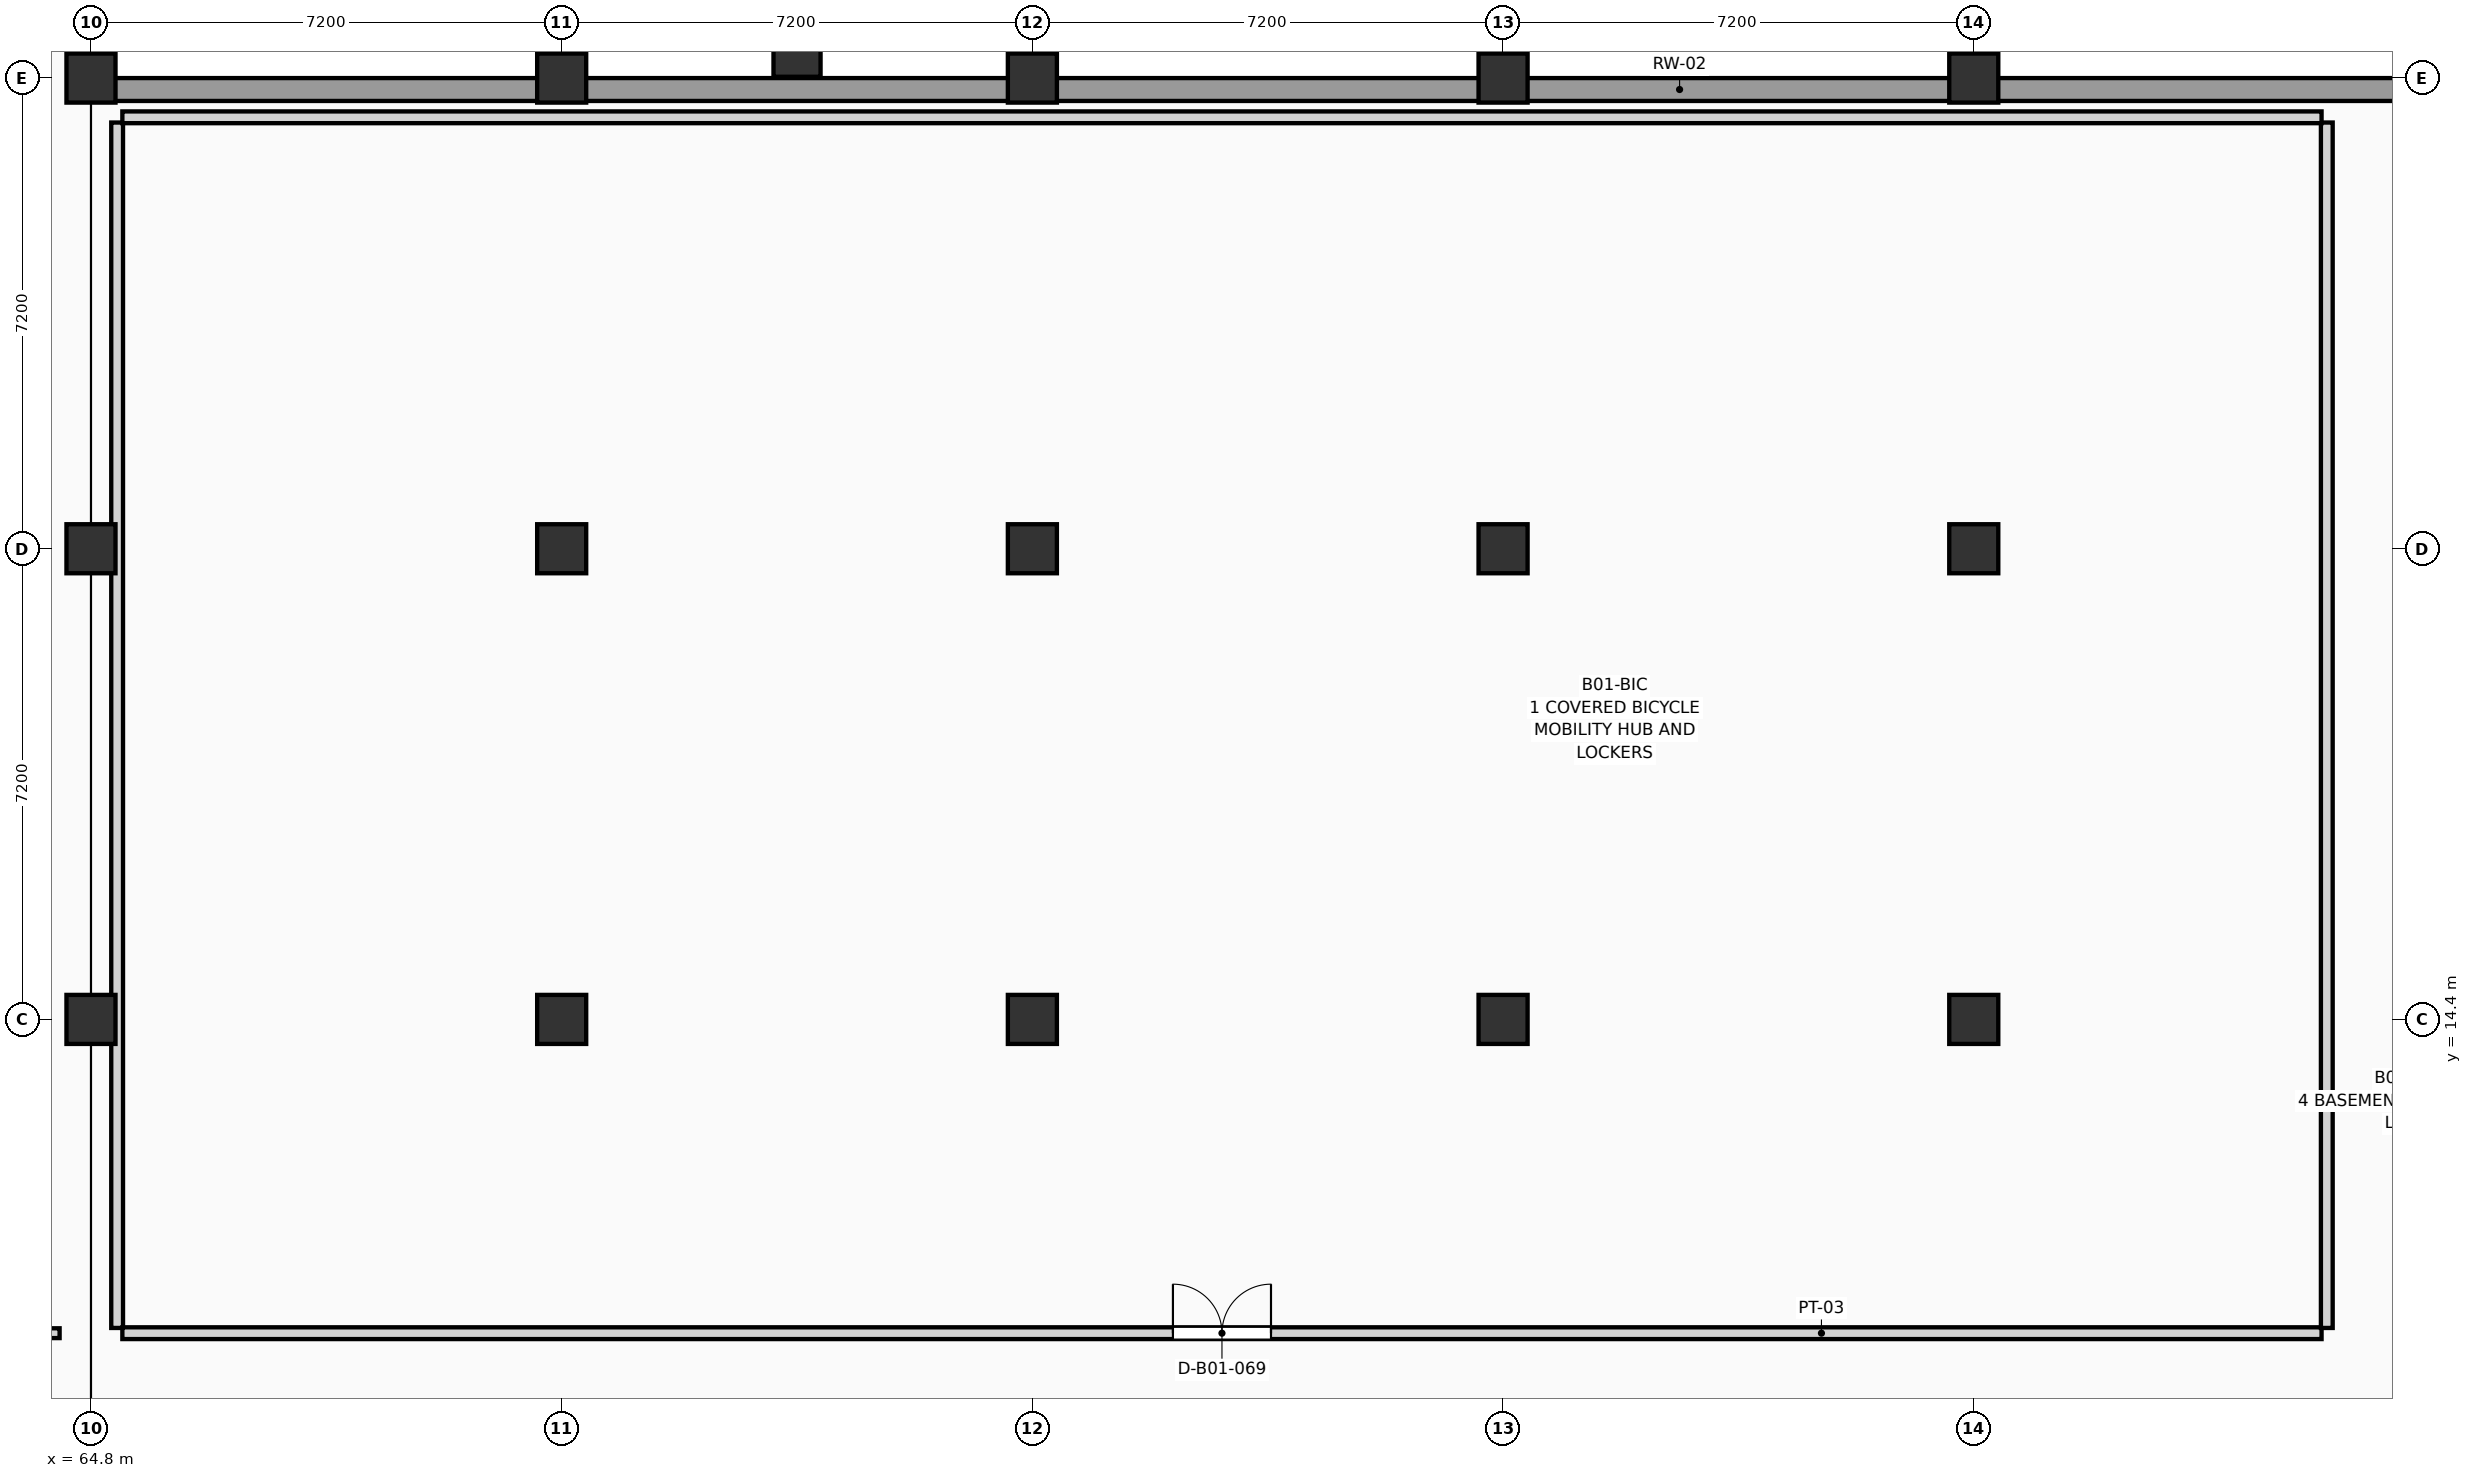
"""IFC4 building model, lengths in metres.
Left out: names, types, materials, properties, quantities, classifications, styles, units other than length and angle.
Written with IfcOpenShell. Run it as: python <this file> out.ifc"""

import sys

from ifc_helpers import new_model, si_unit, direction, frame, frame_2d, origin, origin_2d, place, context, subcontext, project, spatial, rectangle, extrude, element, fill, save


model = new_model("IFC4")
c1 = context("Model", 3, precision=1e-05, world=origin(), true_north=direction((0.0, 1.0)))
c2 = subcontext(c1, "Body", "Model", "MODEL_VIEW")
j1 = project(units=[si_unit("LENGTHUNIT", "METRE"), si_unit("PLANEANGLEUNIT", "RADIAN")], contexts=[c1])
p1 = place(None, origin())
s1 = spatial("IfcSite", under=j1, at=p1, CompositionType="ELEMENT")
p2 = place(p1, origin())
s2 = spatial("IfcBuilding", under=s1, at=p2, CompositionType="ELEMENT")
p3 = place(p2, frame((0.0, 0.0, -4.5)))
s3 = spatial("IfcBuildingStorey", under=s2, at=p3, CompositionType="ELEMENT", Elevation=-4.5)
for number, where, z_axis, x_axis in (
    (1, (64.8, 14.4, -0.3), (0.0, 0.0, 1.0), (1.0, 0.0, 0.0)),
    (2, (64.8, 21.6, -0.3), (0.0, 0.0, 1.0), (1.0, 0.0, 0.0)),
    (3, (64.8, 28.8, -0.3), (0.0, 0.0, 1.0), (1.0, 0.0, 0.0)),
    (4, (72.0, 14.4, -0.3), (0.0, 0.0, 1.0), (1.0, 0.0, 0.0)),
    (5, (72.0, 21.6, -0.3), (0.0, 0.0, 1.0), (1.0, 0.0, 0.0)),
    (6, (72.0, 28.8, -0.3), (0.0, 0.0, 1.0), (1.0, 0.0, 0.0)),
    (7, (79.2, 14.4, -0.3), (0.0, 0.0, 1.0), (1.0, 0.0, 0.0)),
    (8, (79.2, 21.6, -0.3), (0.0, 0.0, 1.0), (1.0, 0.0, 0.0)),
    (9, (79.2, 28.8, -0.3), (0.0, 0.0, 1.0), (1.0, 0.0, 0.0)),
    (10, (86.4, 14.4, -0.3), (0.0, 0.0, 1.0), (1.0, 0.0, 0.0)),
    (11, (86.4, 21.6, -0.3), (0.0, 0.0, 1.0), (1.0, 0.0, 0.0)),
    (12, (86.4, 28.8, -0.3), (0.0, 0.0, 1.0), (1.0, 0.0, 0.0)),
    (13, (93.6, 14.4, -0.3), (0.0, 0.0, 1.0), (1.0, 0.0, 0.0)),
    (14, (93.6, 21.6, -0.3), (0.0, 0.0, 1.0), (1.0, 0.0, 0.0)),
    (15, (93.6, 28.8, -0.3), (0.0, 0.0, 1.0), (1.0, 0.0, 0.0)),
):
    element("IfcColumn", number, at=place(p3, frame(where, z_axis=z_axis, x_axis=x_axis)), inside=s3, PredefinedType="COLUMN", context=c2, shape_type="SweptSolid", body=[
        extrude(rectangle(XDim=0.75, YDim=0.75, at=origin_2d()), origin(), (0.0, 0.0, 1.0), 4.8),
    ])
p4 = place(p3, frame((75.6, 29.08, -0.3), z_axis=(0.0, 0.0, 1.0), x_axis=(0.0, 1.0, 0.0)))
e16 = element("IfcColumn", 16, at=p4, inside=s3, PredefinedType="PILASTER", context=c2, shape_type="SweptSolid", body=[
    extrude(rectangle(XDim=0.52, YDim=0.72, at=origin_2d()), origin(), (0.0, 0.0, 1.0), 4.8),
])
p5 = place(p3, frame((64.625, 56.4, -0.3), z_axis=(0.0, 0.0, 1.0), x_axis=(0.0, -1.0, 0.0)))
e17 = element("IfcWall", 17, at=p5, inside=s3, PredefinedType="USERDEFINED", context=c2, shape_type="SweptSolid", body=[
    extrude(rectangle(XDim=27.6, YDim=0.35, at=frame_2d((13.8, 0.0))), origin(), (0.0, 0.0, 1.0), 4.54),
])
p6 = place(p3, frame((64.8, 28.625, -0.3), z_axis=(0.0, 0.0, 1.0), x_axis=(1.0, 0.0, 0.0)))
e18 = element("IfcWall", 18, at=p6, inside=s3, PredefinedType="USERDEFINED", context=c2, shape_type="SweptSolid", body=[
    extrude(rectangle(XDim=50.4, YDim=0.35, at=frame_2d((25.2, 0.0))), origin(), (0.0, 0.0, 1.0), 4.54),
])
p7 = place(p3, frame((46.88, 9.6, 0.0), z_axis=(0.0, 0.0, 1.0), x_axis=(1.0, 0.0, 0.0)))
e19 = element("IfcWall", 19, at=p7, inside=s3, PredefinedType="PARTITIONING", context=c2, shape_type="SweptSolid", body=[
    extrude(rectangle(XDim=17.44, YDim=0.15, at=frame_2d((8.72, 0.0))), origin(), (0.0, 0.0, 1.0), 4.225),
])
p8 = place(p7, frame((7.97, 0.0, 0.0)))
e20 = element("IfcOpeningElement", 20, at=p8, cuts=e19, PredefinedType="OPENING", context=c2, shape_type="SweptSolid", body=[
    extrude(rectangle(XDim=1.5, YDim=2.2, at=frame_2d((0.75, 1.1))), frame((0.0, 0.087, 0.0), z_axis=(0.0, -1.0, 0.0), x_axis=(1.0, 0.0, 0.0)), (0.0, 0.0, 1.0), 0.174),
])
p9 = place(p3, frame((65.2, 9.68, 0.0), z_axis=(0.0, 0.0, 1.0), x_axis=(0.0, 1.0, 0.0)))
e21 = element("IfcWall", 21, at=p9, inside=s3, PredefinedType="PARTITIONING", context=c2, shape_type="SweptSolid", body=[
    extrude(rectangle(XDim=18.44, YDim=0.18, at=frame_2d((9.22, 0.0))), origin(), (0.0, 0.0, 1.0), 3.375),
])
p10 = place(p3, frame((65.28, 9.6, 0.0), z_axis=(0.0, 0.0, 1.0), x_axis=(1.0, 0.0, 0.0)))
e22 = element("IfcWall", 22, at=p10, inside=s3, PredefinedType="PARTITIONING", context=c2, shape_type="SweptSolid", body=[
    extrude(rectangle(XDim=33.64, YDim=0.18, at=frame_2d((16.82, 0.0))), origin(), (0.0, 0.0, 1.0), 4.225),
])
p11 = place(p10, frame((16.07, 0.0, 0.0)))
e23 = element("IfcOpeningElement", 23, at=p11, cuts=e22, PredefinedType="OPENING", context=c2, shape_type="SweptSolid", body=[
    extrude(rectangle(XDim=1.5, YDim=2.25, at=frame_2d((0.75, 1.125))), frame((0.0, 0.102, 0.0), z_axis=(0.0, -1.0, 0.0), x_axis=(1.0, 0.0, 0.0)), (0.0, 0.0, 1.0), 0.204),
])
p12 = place(p3, frame((99.0, 9.68, 0.0), z_axis=(0.0, 0.0, 1.0), x_axis=(0.0, 1.0, 0.0)))
e24 = element("IfcWall", 24, at=p12, inside=s3, PredefinedType="PARTITIONING", context=c2, shape_type="SweptSolid", body=[
    extrude(rectangle(XDim=18.44, YDim=0.18, at=frame_2d((9.22, 0.0))), origin(), (0.0, 0.0, 1.0), 4.225),
])
p13 = place(p3, frame((65.28, 28.2, 0.0), z_axis=(0.0, 0.0, 1.0), x_axis=(1.0, 0.0, 0.0)))
e25 = element("IfcWall", 25, at=p13, inside=s3, PredefinedType="PARTITIONING", context=c2, shape_type="SweptSolid", body=[
    extrude(rectangle(XDim=33.64, YDim=0.18, at=frame_2d((16.82, 0.0))), origin(), (0.0, 0.0, 1.0), 4.225),
])
p14 = place(p11, origin())
e26 = element("IfcDoor", 26, at=p14, inside=s3, OperationType="DOUBLE_DOOR_SINGLE_SWING", PredefinedType="DOOR", context=c2, shape_type="SweptSolid", body=[
    extrude(rectangle(XDim=1.5, YDim=2.25, at=frame_2d((0.75, 1.125))), frame((0.0, 0.025, 0.0), z_axis=(0.0, -1.0, 0.0), x_axis=(1.0, 0.0, 0.0)), (0.0, 0.0, 1.0), 0.05),
])
fill(e23, e26)
save(model, sys.argv[1])
